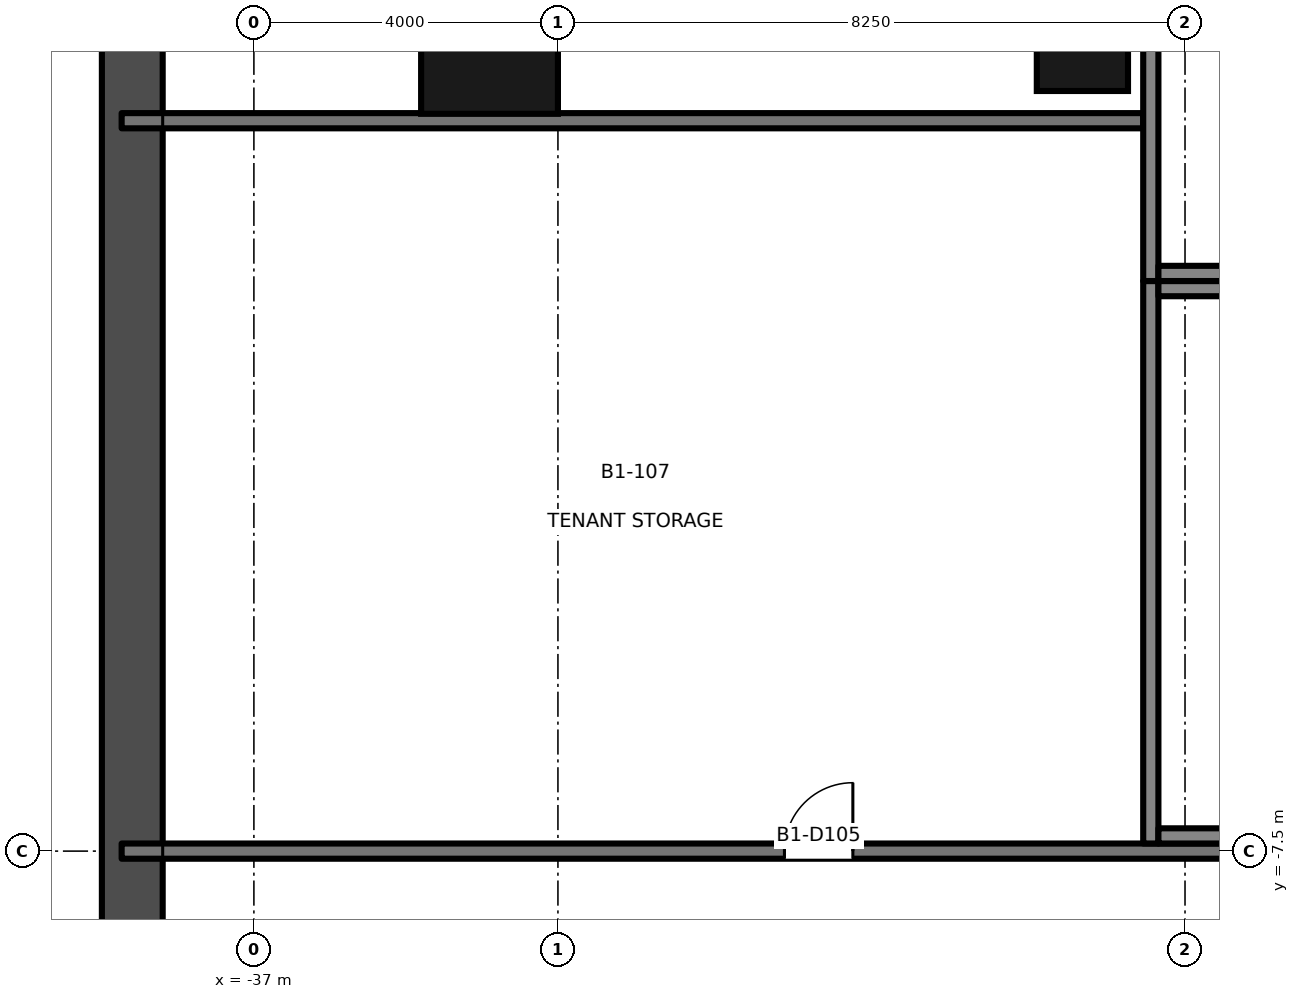
"""IFC4 building model, lengths in metres.
Left out: names, types, materials, properties, quantities, classifications, styles, units other than length and angle.
Written with IfcOpenShell. Run it as: python <this file> out.ifc"""

import sys

from ifc_helpers import new_model, si_unit, direction, frame, frame_2d, origin, origin_2d, place, context, subcontext, project, spatial, rectangle, extrude, element, fill, save


model = new_model("IFC4")
c1 = context("Model", 3, precision=1e-05, world=origin(), true_north=direction((0.0, 1.0)))
c2 = subcontext(c1, "Body", "Model", "MODEL_VIEW")
j1 = project(units=[si_unit("LENGTHUNIT", "METRE"), si_unit("PLANEANGLEUNIT", "RADIAN")], contexts=[c1])
p1 = place(None, origin())
s1 = spatial("IfcSite", under=j1, at=p1, CompositionType="ELEMENT")
p2 = place(p1, origin())
s2 = spatial("IfcBuilding", under=s1, at=p2, CompositionType="ELEMENT")
p3 = place(p2, frame((0.0, 0.0, -5.5)))
s3 = spatial("IfcBuildingStorey", under=s2, at=p3, CompositionType="ELEMENT", Elevation=-5.5)
p4 = place(p3, frame((-38.6, -38.7, -0.2), z_axis=(0.0, 0.0, 1.0), x_axis=(0.0, 1.0, 0.0)))
e1 = element("IfcWall", 1, at=p4, inside=s3, PredefinedType="SOLIDWALL", context=c2, shape_type="SweptSolid", body=[
    extrude(rectangle(XDim=51.9, YDim=0.8, at=frame_2d((25.95, 0.0))), origin(), (0.0, 0.0, 1.0), 5.5),
])
p5 = place(p3, frame((-33.9, 3.1, -0.2), z_axis=(0.0, 0.0, 1.0), x_axis=(0.0, 1.0, 0.0)))
e2 = element("IfcColumn", 2, at=p5, inside=s3, PredefinedType="COLUMN", context=c2, shape_type="SweptSolid", body=[
    extrude(rectangle(XDim=1.8, YDim=1.8, at=origin_2d()), origin(), (0.0, 0.0, 1.0), 5.5),
])
p6 = place(p3, frame((-26.1, 3.1, -0.2), z_axis=(0.0, 0.0, 1.0), x_axis=(1.0, 0.0, 0.0)))
e3 = element("IfcColumn", 3, at=p6, inside=s3, PredefinedType="COLUMN", context=c2, shape_type="SweptSolid", body=[
    extrude(rectangle(XDim=1.2, YDim=1.2, at=origin_2d()), origin(), (0.0, 0.0, 1.0), 5.5),
])
p7 = place(p3, frame((-25.2, -7.4, -0.2), z_axis=(0.0, 0.0, 1.0), x_axis=(0.0, 1.0, 0.0)))
e4 = element("IfcWall", 4, at=p7, inside=s3, PredefinedType="SHEAR", context=c2, shape_type="SweptSolid", body=[
    extrude(rectangle(XDim=7.4, YDim=0.2, at=frame_2d((3.7, 0.0))), origin(), (0.0, 0.0, 1.0), 5.5),
])
for number, where, z_axis, x_axis in (
    (5, (-25.1, -0.1, -0.2), (0.0, 0.0, 1.0), (1.0, 0.0, 0.0)),
    (6, (-25.1, -7.3, -0.2), (0.0, 0.0, 1.0), (1.0, 0.0, 0.0)),
):
    element("IfcWall", number, at=place(p3, frame(where, z_axis=z_axis, x_axis=x_axis)), inside=s3, PredefinedType="SHEAR", context=c2, shape_type="SweptSolid", body=[
        extrude(rectangle(XDim=4.5, YDim=0.2, at=frame_2d((2.25, 0.0))), origin(), (0.0, 0.0, 1.0), 5.5),
    ])
p8 = place(p3, frame((-25.2, 0.0, -0.2), z_axis=(0.0, 0.0, 1.0), x_axis=(0.0, 1.0, 0.0)))
e7 = element("IfcWall", 7, at=p8, inside=s3, PredefinedType="SHEAR", context=c2, shape_type="SweptSolid", body=[
    extrude(rectangle(XDim=7.4, YDim=0.2, at=frame_2d((3.7, 0.0))), origin(), (0.0, 0.0, 1.0), 5.5),
])
p9 = place(p3, frame((-25.1, 0.1, -0.2), z_axis=(0.0, 0.0, 1.0), x_axis=(1.0, 0.0, 0.0)))
e8 = element("IfcWall", 8, at=p9, inside=s3, PredefinedType="SHEAR", context=c2, shape_type="SweptSolid", body=[
    extrude(rectangle(XDim=4.5, YDim=0.2, at=frame_2d((2.25, 0.0))), origin(), (0.0, 0.0, 1.0), 5.5),
])
p10 = place(p3, frame((-38.74, -7.5, 0.0), z_axis=(0.0, 0.0, 1.0), x_axis=(1.0, 0.0, 0.0)))
e9 = element("IfcWall", 9, at=p10, inside=s3, PredefinedType="PARTITIONING", context=c2, shape_type="SweptSolid", body=[
    extrude(rectangle(XDim=18.34, YDim=0.2, at=frame_2d((9.17, 0.0))), origin(), (0.0, 0.0, 1.0), 4.1),
])
p11 = place(p10, frame((8.72, 0.0, 0.0)))
e10 = element("IfcOpeningElement", 10, at=p11, cuts=e9, PredefinedType="OPENING", context=c2, shape_type="SweptSolid", body=[
    extrude(rectangle(XDim=0.9, YDim=2.1, at=frame_2d((0.45, 1.05))), frame((0.0, 0.111, 0.0), z_axis=(0.0, -1.0, 0.0), x_axis=(1.0, 0.0, 0.0)), (0.0, 0.0, 1.0), 0.221),
])
p12 = place(p3, frame((-38.74, 2.109, 0.0), z_axis=(0.0, 0.0, 1.0), x_axis=(1.0, 0.0, 0.0)))
e11 = element("IfcWall", 11, at=p12, inside=s3, PredefinedType="PARTITIONING", context=c2, shape_type="SweptSolid", body=[
    extrude(rectangle(XDim=13.44, YDim=0.2, at=frame_2d((6.72, 0.0))), origin(), (0.0, 0.0, 1.0), 4.1),
])
p13 = place(p11, origin())
e12 = element("IfcDoor", 12, at=p13, inside=s3, OperationType="SINGLE_SWING_RIGHT", PredefinedType="DOOR", context=c2, shape_type="SweptSolid", body=[
    extrude(rectangle(XDim=0.9, YDim=2.1, at=frame_2d((0.45, 1.05))), frame((0.0, 0.025, 0.0), z_axis=(0.0, -1.0, 0.0), x_axis=(1.0, 0.0, 0.0)), (0.0, 0.0, 1.0), 0.05),
])
fill(e10, e12)
save(model, sys.argv[1])
